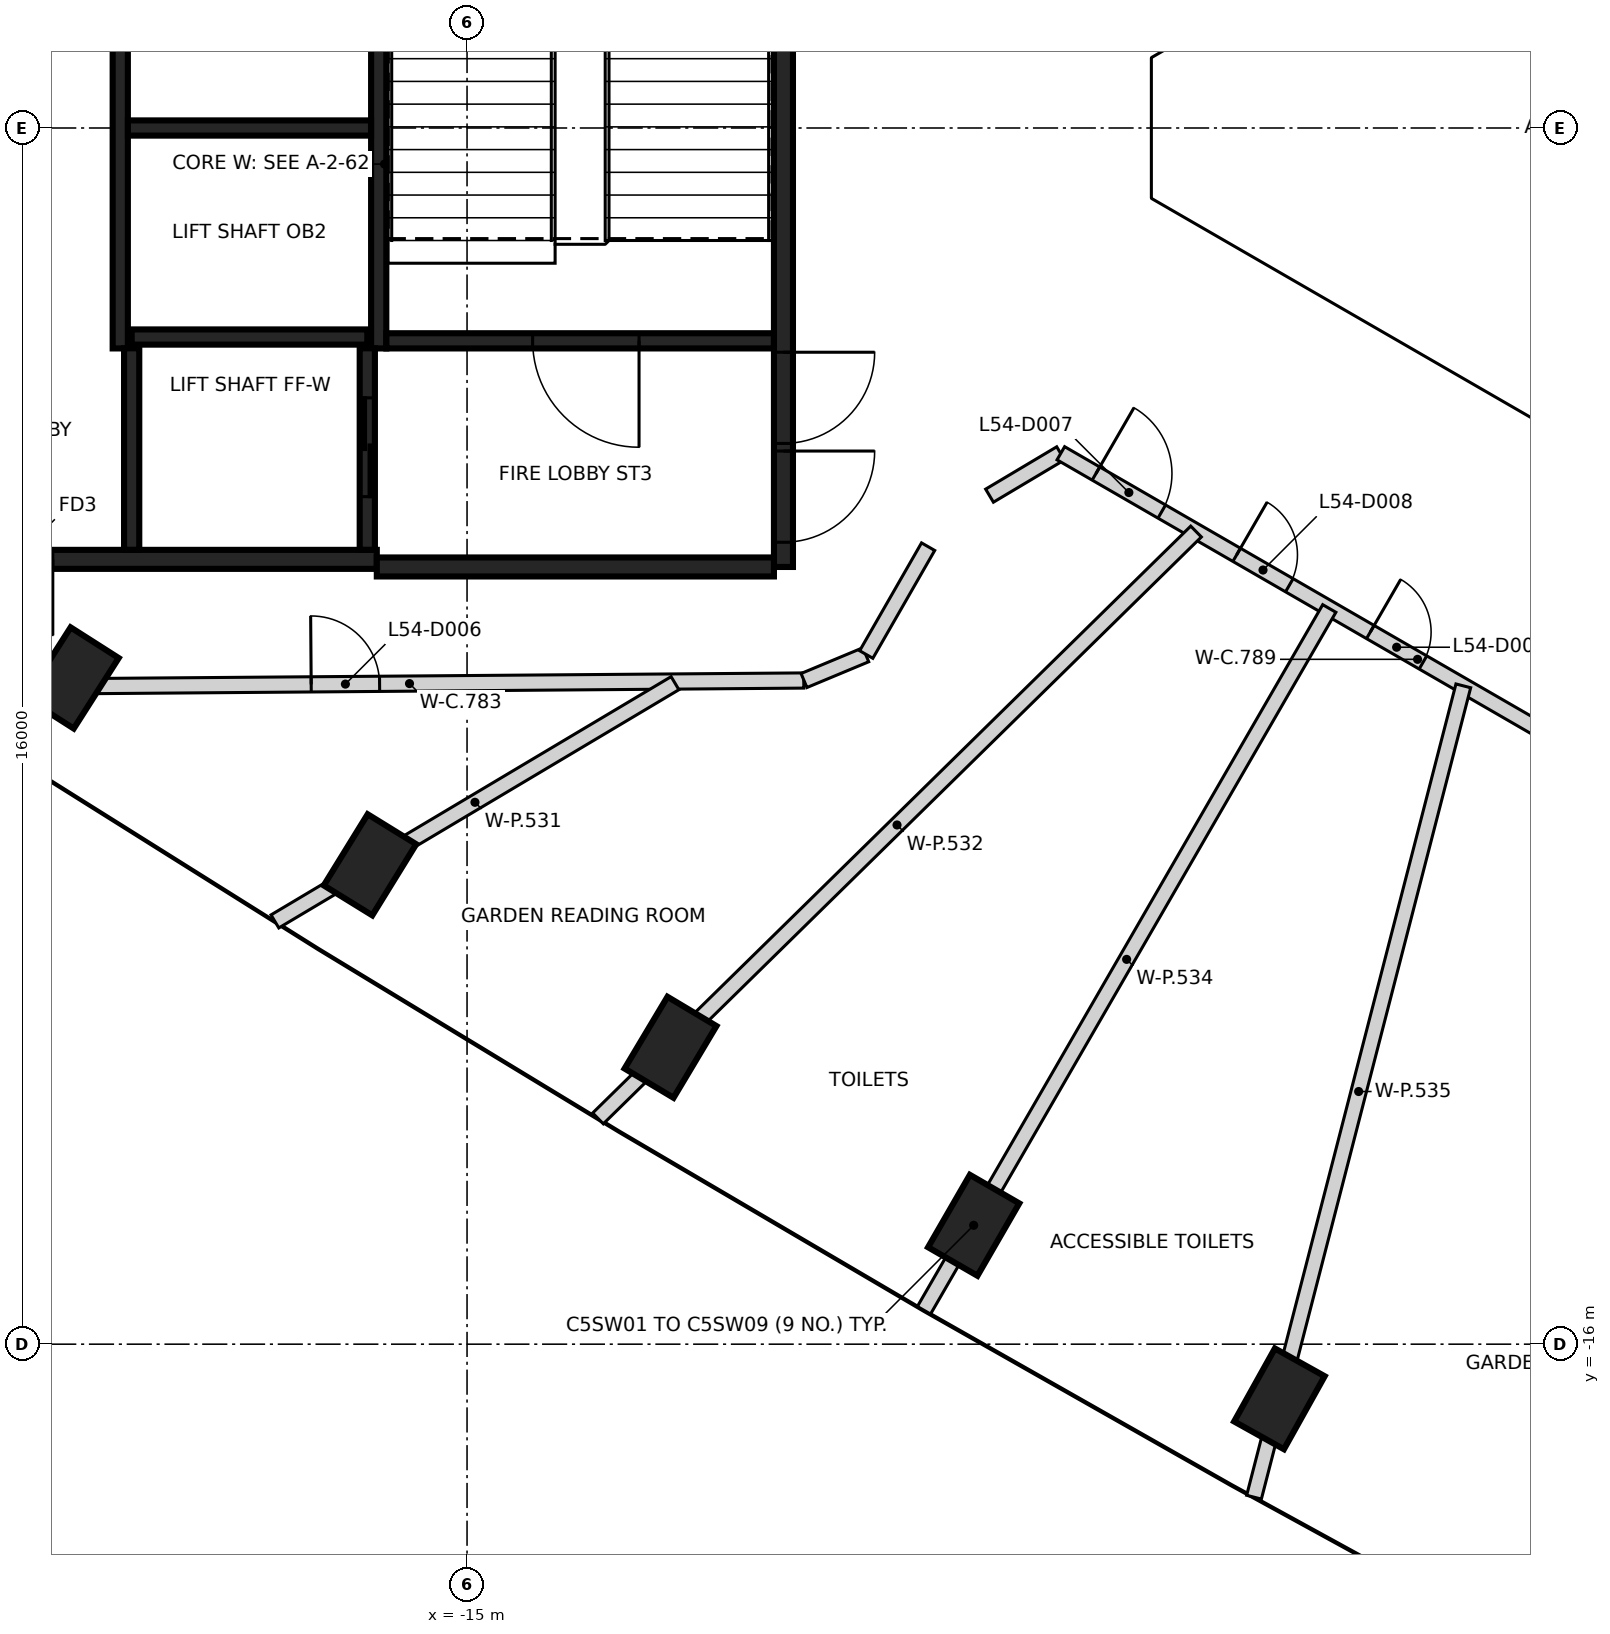
"""IFC4 building model, lengths in metres.
Left out: names, types, materials, properties, quantities, classifications, styles, units other than length and angle.
Written with IfcOpenShell. Run it as: python <this file> out.ifc"""

import sys

from ifc_helpers import new_model, si_unit, direction, frame, frame_2d, origin, origin_2d, place, context, subcontext, project, spatial, rectangle, extrude, element, fill, save


model = new_model("IFC4")
c1 = context("Model", 3, precision=1e-05, world=origin(), true_north=direction((0.0, 1.0)))
c2 = subcontext(c1, "Body", "Model", "MODEL_VIEW")
j1 = project(units=[si_unit("LENGTHUNIT", "METRE"), si_unit("PLANEANGLEUNIT", "RADIAN")], contexts=[c1])
p1 = place(None, origin())
s1 = spatial("IfcSite", under=j1, at=p1, CompositionType="ELEMENT")
p2 = place(p1, origin())
s2 = spatial("IfcBuilding", under=s1, at=p2, CompositionType="ELEMENT")
p3 = place(p2, frame((0.0, 0.0, 216.4)))
s3 = spatial("IfcBuildingStorey", under=s2, at=p3, CompositionType="ELEMENT", Elevation=216.4)
for number, where, z_axis, x_axis in (
    (1, (-20.195, -7.235, -0.35), (0.0, 0.0, 1.0), (0.538, 0.843, 0.0)),
    (2, (-16.277, -9.693, -0.35), (0.0, 0.0, 1.0), (0.525, 0.851, 0.0)),
    (3, (-12.323, -12.094, -0.35), (0.0, 0.0, 1.0), (0.513, 0.858, 0.0)),
    (4, (-8.335, -14.436, -0.35), (0.0, 0.0, 1.0), (0.5, 0.866, 0.0)),
    (5, (-4.312, -16.719, -0.35), (0.0, 0.0, 1.0), (0.487, 0.873, 0.0)),
):
    element("IfcColumn", number, at=place(p3, frame(where, z_axis=z_axis, x_axis=x_axis)), inside=s3, PredefinedType="COLUMN", context=c2, shape_type="SweptSolid", body=[
        extrude(rectangle(XDim=1.1, YDim=0.75, at=origin_2d()), origin(), (0.0, 0.0, 1.0), 5.0),
    ])
p4 = place(p3, frame((-10.837, 5.775, 0.0), z_axis=(0.0, 0.0, 1.0), x_axis=(0.0, -1.0, 0.0)))
e6 = element("IfcWall", 6, at=p4, inside=s3, PredefinedType="SHEAR", context=c2, shape_type="SweptSolid", body=[
    extrude(rectangle(XDim=11.55, YDim=0.25, at=frame_2d((5.775, 0.0))), origin(), (0.0, 0.0, 1.0), 4.65),
])
p5 = place(p4, frame((10.025, 0.0, 0.0)))
e7 = element("IfcOpeningElement", 7, at=p5, cuts=e6, PredefinedType="OPENING", context=c2, shape_type="SweptSolid", body=[
    extrude(rectangle(XDim=1.2, YDim=2.1, at=frame_2d((0.6, 1.05))), frame((0.0, 0.135, 0.0), z_axis=(0.0, -1.0, 0.0), x_axis=(1.0, 0.0, 0.0)), (0.0, 0.0, 1.0), 0.27),
])
p6 = place(p4, frame((8.725, 0.0, 0.0)))
e8 = element("IfcOpeningElement", 8, at=p6, cuts=e6, PredefinedType="OPENING", context=c2, shape_type="SweptSolid", body=[
    extrude(rectangle(XDim=1.2, YDim=2.1, at=frame_2d((0.6, 1.05))), frame((0.0, 0.135, 0.0), z_axis=(0.0, -1.0, 0.0), x_axis=(1.0, 0.0, 0.0)), (0.0, 0.0, 1.0), 0.27),
])
p7 = place(p3, frame((-16.187, -5.675, 0.0), z_axis=(0.0, 0.0, 1.0), x_axis=(-1.0, 0.0, 0.0)))
e9 = element("IfcWall", 9, at=p7, inside=s3, PredefinedType="SHEAR", context=c2, shape_type="SweptSolid", body=[
    extrude(rectangle(XDim=6.125, YDim=0.25, at=frame_2d((3.062, 0.0))), origin(), (0.0, 0.0, 1.0), 4.65),
])
p8 = place(p7, frame((4.263, 0.0, 0.0)))
e10 = element("IfcOpeningElement", 10, at=p8, cuts=e9, PredefinedType="OPENING", context=c2, shape_type="SweptSolid", body=[
    extrude(rectangle(XDim=1.0, YDim=2.1, at=frame_2d((0.5, 1.05))), frame((0.0, 0.135, 0.0), z_axis=(0.0, -1.0, 0.0), x_axis=(1.0, 0.0, 0.0)), (0.0, 0.0, 1.0), 0.27),
])
p9 = place(p3, frame((-10.963, -5.775, 0.0), z_axis=(0.0, 0.0, 1.0), x_axis=(-1.0, 0.0, 0.0)))
e11 = element("IfcWall", 11, at=p9, inside=s3, PredefinedType="SHEAR", context=c2, shape_type="SweptSolid", body=[
    extrude(rectangle(XDim=5.225, YDim=0.25, at=frame_2d((2.612, 0.0))), origin(), (0.0, 0.0, 1.0), 4.65),
])
p10 = place(p3, frame((-16.162, 3.074, 0.0), z_axis=(0.0, 0.0, 1.0), x_axis=(0.0, -1.0, 0.0)))
e12 = element("IfcWall", 12, at=p10, inside=s3, PredefinedType="SHEAR", context=c2, shape_type="SweptSolid", body=[
    extrude(rectangle(XDim=5.974, YDim=0.2, at=frame_2d((2.987, 0.0))), origin(), (0.0, 0.0, 1.0), 4.65),
])
p11 = place(p3, frame((-19.562, -2.9, 0.0), z_axis=(0.0, 0.0, 1.0), x_axis=(0.0, 1.0, 0.0)))
e13 = element("IfcWall", 13, at=p11, inside=s3, PredefinedType="SHEAR", context=c2, shape_type="SweptSolid", body=[
    extrude(rectangle(XDim=6.1, YDim=0.2, at=frame_2d((3.05, 0.0))), origin(), (0.0, 0.0, 1.0), 4.65),
])
p12 = place(p3, frame((-10.963, -2.8, 0.0), z_axis=(0.0, 0.0, 1.0), x_axis=(-1.0, 0.0, 0.0)))
e14 = element("IfcWall", 14, at=p12, inside=s3, PredefinedType="SHEAR", context=c2, shape_type="SweptSolid", body=[
    extrude(rectangle(XDim=5.098, YDim=0.2, at=frame_2d((2.549, 0.0))), origin(), (0.0, 0.0, 1.0), 4.65),
])
p13 = place(p12, frame((1.774, 0.0, 0.0)))
e15 = element("IfcOpeningElement", 15, at=p13, cuts=e14, PredefinedType="OPENING", context=c2, shape_type="SweptSolid", body=[
    extrude(rectangle(XDim=1.4, YDim=2.1, at=frame_2d((0.7, 1.05))), frame((0.0, 0.11, 0.0), z_axis=(0.0, -1.0, 0.0), x_axis=(1.0, 0.0, 0.0)), (0.0, 0.0, 1.0), 0.22),
])
p14 = place(p3, frame((-16.263, 0.0, 0.0), z_axis=(0.0, 0.0, 1.0), x_axis=(-1.0, 0.0, 0.0)))
e16 = element("IfcWall", 16, at=p14, inside=s3, PredefinedType="SHEAR", context=c2, shape_type="SweptSolid", body=[
    extrude(rectangle(XDim=3.198, YDim=0.2, at=frame_2d((1.599, 0.0))), origin(), (0.0, 0.0, 1.0), 4.65),
])
p15 = place(p3, frame((-19.412, -2.75, 0.0), z_axis=(0.0, 0.0, 1.0), x_axis=(1.0, 0.0, 0.0)))
e17 = element("IfcWall", 17, at=p15, inside=s3, PredefinedType="SHEAR", context=c2, shape_type="SweptSolid", body=[
    extrude(rectangle(XDim=3.1, YDim=0.2, at=frame_2d((1.55, 0.0))), origin(), (0.0, 0.0, 1.0), 4.65),
])
p16 = place(p3, frame((-16.312, -2.898, 0.0), z_axis=(0.0, 0.0, 1.0), x_axis=(0.0, -1.0, 0.0)))
e18 = element("IfcWall", 18, at=p16, inside=s3, PredefinedType="SHEAR", context=c2, shape_type="SweptSolid", body=[
    extrude(rectangle(XDim=2.651, YDim=0.2, at=frame_2d((1.325, 0.0))), origin(), (0.0, 0.0, 1.0), 4.65),
])
p17 = place(p16, frame((0.652, 0.0, 0.0)))
e19 = element("IfcOpeningElement", 19, at=p17, cuts=e18, PredefinedType="OPENING", context=c2, shape_type="SweptSolid", body=[
    extrude(rectangle(XDim=1.3, YDim=2.1, at=frame_2d((0.65, 1.05))), frame((0.0, 0.11, 0.0), z_axis=(0.0, -1.0, 0.0), x_axis=(1.0, 0.0, 0.0)), (0.0, 0.0, 1.0), 0.22),
])
p18 = place(p3, frame((-19.412, -5.549, 0.0), z_axis=(0.0, 0.0, 1.0), x_axis=(0.0, 1.0, 0.0)))
e20 = element("IfcWall", 20, at=p18, inside=s3, PredefinedType="SHEAR", context=c2, shape_type="SweptSolid", body=[
    extrude(rectangle(XDim=2.651, YDim=0.2, at=frame_2d((1.325, 0.0))), origin(), (0.0, 0.0, 1.0), 4.65),
])
p19 = place(p3, frame((-20.944, -7.35, 0.0), z_axis=(0.0, 0.0, 1.0), x_axis=(0.999969293938, 0.007836528638, 0.0)))
e21 = element("IfcWall", 21, at=p19, inside=s3, PredefinedType="PARTITIONING", context=c2, shape_type="SweptSolid", body=[
    extrude(rectangle(XDim=10.374, YDim=0.2, at=frame_2d((5.187, 0.0))), origin(), (0.0, 0.0, 1.0), 3.75),
])
p20 = place(p19, frame((3.894, 0.0, 0.0)))
e22 = element("IfcOpeningElement", 22, at=p20, cuts=e21, PredefinedType="OPENING", context=c2, shape_type="SweptSolid", body=[
    extrude(rectangle(XDim=0.9, YDim=2.1, at=frame_2d((0.45, 1.05))), frame((0.0, 0.11, 0.0), z_axis=(0.0, -1.0, 0.0), x_axis=(1.0, 0.0, 0.0)), (0.0, 0.0, 1.0), 0.22),
])
p21 = place(p3, frame((-10.567, -7.269, 0.0), z_axis=(0.0, 0.0, 1.0), x_axis=(0.922929257273, 0.384969591097, 0.0)))
e23 = element("IfcWall", 23, at=p21, inside=s3, PredefinedType="PARTITIONING", context=c2, shape_type="SweptSolid", body=[
    extrude(rectangle(XDim=0.881, YDim=0.2, at=frame_2d((0.44, 0.0))), origin(), (0.0, 0.0, 1.0), 4.65),
])
p22 = place(p3, frame((-9.748, -6.927, 0.0), z_axis=(0.0, 0.0, 1.0), x_axis=(0.497584783928, 0.867415346188, 0.0)))
e24 = element("IfcWall", 24, at=p22, inside=s3, PredefinedType="PARTITIONING", context=c2, shape_type="SweptSolid", body=[
    extrude(rectangle(XDim=1.636, YDim=0.2, at=frame_2d((0.818, 0.0))), origin(), (0.0, 0.0, 1.0), 4.65),
])
p23 = place(p3, frame((-8.126, -4.837, 0.0), z_axis=(0.0, 0.0, 1.0), x_axis=(0.859170790223, 0.511688922323, 0.0)))
e25 = element("IfcWall", 25, at=p23, inside=s3, PredefinedType="PARTITIONING", context=c2, shape_type="SweptSolid", body=[
    extrude(rectangle(XDim=1.088, YDim=0.2, at=frame_2d((0.544, 0.0))), origin(), (0.0, 0.0, 1.0), 4.65),
])
p24 = place(p3, frame((-7.188, -4.279, 0.0), z_axis=(0.0, 0.0, 1.0), x_axis=(0.865917749919, -0.500186415625, 0.0)))
e26 = element("IfcWall", 26, at=p24, inside=s3, PredefinedType="PARTITIONING", context=c2, shape_type="SweptSolid", body=[
    extrude(rectangle(XDim=10.84, YDim=0.2, at=frame_2d((5.42, 0.0))), origin(), (0.0, 0.0, 1.0), 4.65),
])
p25 = place(p24, frame((0.534, 0.0, 0.0)))
e27 = element("IfcOpeningElement", 27, at=p25, cuts=e26, PredefinedType="OPENING", context=c2, shape_type="SweptSolid", body=[
    extrude(rectangle(XDim=1.0, YDim=2.1, at=frame_2d((0.5, 1.05))), frame((0.0, 0.11, 0.0), z_axis=(0.0, -1.0, 0.0), x_axis=(1.0, 0.0, 0.0)), (0.0, 0.0, 1.0), 0.22),
])
p26 = place(p24, frame((2.672, 0.0, 0.0)))
e28 = element("IfcOpeningElement", 28, at=p26, cuts=e26, PredefinedType="OPENING", context=c2, shape_type="SweptSolid", body=[
    extrude(rectangle(XDim=0.8, YDim=2.1, at=frame_2d((0.4, 1.05))), frame((0.0, 0.11, 0.0), z_axis=(0.0, -1.0, 0.0), x_axis=(1.0, 0.0, 0.0)), (0.0, 0.0, 1.0), 0.22),
])
p27 = place(p24, frame((4.702, 0.0, 0.0)))
e29 = element("IfcOpeningElement", 29, at=p27, cuts=e26, PredefinedType="OPENING", context=c2, shape_type="SweptSolid", body=[
    extrude(rectangle(XDim=0.8, YDim=2.1, at=frame_2d((0.4, 1.05))), frame((0.0, 0.11, 0.0), z_axis=(0.0, -1.0, 0.0), x_axis=(1.0, 0.0, 0.0)), (0.0, 0.0, 1.0), 0.22),
])
p28 = place(p24, frame((7.973, 0.0, 0.0)))
e30 = element("IfcOpeningElement", 30, at=p28, cuts=e26, PredefinedType="OPENING", context=c2, shape_type="SweptSolid", body=[
    extrude(rectangle(XDim=1.0, YDim=2.1, at=frame_2d((0.5, 1.05))), frame((0.0, 0.11, 0.0), z_axis=(0.0, -1.0, 0.0), x_axis=(1.0, 0.0, 0.0)), (0.0, 0.0, 1.0), 0.22),
])
p29 = place(p3, frame((-17.528, -10.438, 0.0), z_axis=(0.0, 0.0, 1.0), x_axis=(0.859211134108, 0.51162117531, 0.0)))
e31 = element("IfcWall", 31, at=p29, inside=s3, PredefinedType="PARTITIONING", context=c2, shape_type="SweptSolid", body=[
    extrude(rectangle(XDim=6.126, YDim=0.2, at=frame_2d((3.063, 0.0))), origin(), (0.0, 0.0, 1.0), 4.65),
])
p30 = place(p3, frame((-13.277, -13.03, 0.0), z_axis=(0.0, 0.0, 1.0), x_axis=(0.713763428774, 0.700386870054, 0.0)))
e32 = element("IfcWall", 32, at=p30, inside=s3, PredefinedType="PARTITIONING", context=c2, shape_type="SweptSolid", body=[
    extrude(rectangle(XDim=11.024, YDim=0.2, at=frame_2d((5.512, 0.0))), origin(), (0.0, 0.0, 1.0), 4.65),
])
p31 = place(p3, frame((-8.989, -15.554, 0.0), z_axis=(0.0, 0.0, 1.0), x_axis=(0.500133388309, 0.865948378311, 0.0)))
e33 = element("IfcWall", 33, at=p31, inside=s3, PredefinedType="PARTITIONING", context=c2, shape_type="SweptSolid", body=[
    extrude(rectangle(XDim=10.662, YDim=0.2, at=frame_2d((5.331, 0.0))), origin(), (0.0, 0.0, 1.0), 4.65),
])
p32 = place(p3, frame((-4.646, -18.013, 0.0), z_axis=(0.0, 0.0, 1.0), x_axis=(0.249782901113, 0.968301865283, 0.0)))
e34 = element("IfcWall", 34, at=p32, inside=s3, PredefinedType="PARTITIONING", context=c2, shape_type="SweptSolid", body=[
    extrude(rectangle(XDim=11.023, YDim=0.2, at=frame_2d((5.512, 0.0))), origin(), (0.0, 0.0, 1.0), 4.65),
])
p33 = place(p3, frame((0.0, 0.0, -0.35)))
p34 = place(p33, origin())
p35 = place(p34, frame((0.0, 0.0, 0.3)))
e35 = element("IfcWindow", 35, at=p35, inside=s3, PartitioningType="SINGLE_PANEL", PredefinedType="SKYLIGHT", context=c2, shape_type="SweptSolid", body=[
    extrude(rectangle(XDim=6.41, YDim=4.0, at=origin_2d()), origin(), (0.0, 0.0, 1.0), 0.05),
])
p36 = place(p17, origin())
e36 = element("IfcDoor", 36, at=p36, inside=s3, OperationType="SLIDING_TO_RIGHT", PredefinedType="DOOR", context=c2, shape_type="SweptSolid", body=[
    extrude(rectangle(XDim=1.3, YDim=2.1, at=frame_2d((0.65, 1.05))), frame((0.0, 0.025, 0.0), z_axis=(0.0, -1.0, 0.0), x_axis=(1.0, 0.0, 0.0)), (0.0, 0.0, 1.0), 0.05),
])
fill(e19, e36)
p37 = place(p8, origin())
e37 = element("IfcDoor", 37, at=p37, inside=s3, OperationType="SINGLE_SWING_LEFT", PredefinedType="DOOR", context=c2, shape_type="SweptSolid", body=[
    extrude(rectangle(XDim=1.0, YDim=2.1, at=frame_2d((0.5, 1.05))), frame((0.0, 0.025, 0.0), z_axis=(0.0, -1.0, 0.0), x_axis=(1.0, 0.0, 0.0)), (0.0, 0.0, 1.0), 0.05),
])
fill(e10, e37)
p38 = place(p5, origin())
e38 = element("IfcDoor", 38, at=p38, inside=s3, OperationType="SINGLE_SWING_LEFT", PredefinedType="DOOR", context=c2, shape_type="SweptSolid", body=[
    extrude(rectangle(XDim=1.2, YDim=2.1, at=frame_2d((0.6, 1.05))), frame((0.0, 0.025, 0.0), z_axis=(0.0, -1.0, 0.0), x_axis=(1.0, 0.0, 0.0)), (0.0, 0.0, 1.0), 0.05),
])
fill(e7, e38)
p39 = place(p6, origin())
e39 = element("IfcDoor", 39, at=p39, inside=s3, OperationType="SINGLE_SWING_RIGHT", PredefinedType="DOOR", context=c2, shape_type="SweptSolid", body=[
    extrude(rectangle(XDim=1.2, YDim=2.1, at=frame_2d((0.6, 1.05))), frame((0.0, 0.025, 0.0), z_axis=(0.0, -1.0, 0.0), x_axis=(1.0, 0.0, 0.0)), (0.0, 0.0, 1.0), 0.05),
])
fill(e8, e39)
p40 = place(p13, origin())
e40 = element("IfcDoor", 40, at=p40, inside=s3, OperationType="SINGLE_SWING_RIGHT", PredefinedType="DOOR", context=c2, shape_type="SweptSolid", body=[
    extrude(rectangle(XDim=1.4, YDim=2.1, at=frame_2d((0.7, 1.05))), frame((0.0, 0.025, 0.0), z_axis=(0.0, -1.0, 0.0), x_axis=(1.0, 0.0, 0.0)), (0.0, 0.0, 1.0), 0.05),
])
fill(e15, e40)
p41 = place(p20, origin())
e41 = element("IfcDoor", 41, at=p41, inside=s3, OperationType="SINGLE_SWING_LEFT", PredefinedType="DOOR", context=c2, shape_type="SweptSolid", body=[
    extrude(rectangle(XDim=0.9, YDim=2.1, at=frame_2d((0.45, 1.05))), frame((0.0, 0.025, 0.0), z_axis=(0.0, -1.0, 0.0), x_axis=(1.0, 0.0, 0.0)), (0.0, 0.0, 1.0), 0.05),
])
fill(e22, e41)
p42 = place(p25, frame((1.0, 0.0, 0.0), z_axis=(0.0, 0.0, 1.0), x_axis=(-1.0, 0.0, 0.0)))
e42 = element("IfcDoor", 42, at=p42, inside=s3, OperationType="SINGLE_SWING_LEFT", PredefinedType="DOOR", context=c2, shape_type="SweptSolid", body=[
    extrude(rectangle(XDim=1.0, YDim=2.1, at=frame_2d((0.5, 1.05))), frame((0.0, 0.025, 0.0), z_axis=(0.0, -1.0, 0.0), x_axis=(1.0, 0.0, 0.0)), (0.0, 0.0, 1.0), 0.05),
])
fill(e27, e42)
p43 = place(p26, frame((0.8, 0.0, 0.0), z_axis=(0.0, 0.0, 1.0), x_axis=(-1.0, 0.0, 0.0)))
e43 = element("IfcDoor", 43, at=p43, inside=s3, OperationType="SINGLE_SWING_LEFT", PredefinedType="DOOR", context=c2, shape_type="SweptSolid", body=[
    extrude(rectangle(XDim=0.8, YDim=2.1, at=frame_2d((0.4, 1.05))), frame((0.0, 0.025, 0.0), z_axis=(0.0, -1.0, 0.0), x_axis=(1.0, 0.0, 0.0)), (0.0, 0.0, 1.0), 0.05),
])
fill(e28, e43)
p44 = place(p27, frame((0.8, 0.0, 0.0), z_axis=(0.0, 0.0, 1.0), x_axis=(-1.0, 0.0, 0.0)))
e44 = element("IfcDoor", 44, at=p44, inside=s3, OperationType="SINGLE_SWING_LEFT", PredefinedType="DOOR", context=c2, shape_type="SweptSolid", body=[
    extrude(rectangle(XDim=0.8, YDim=2.1, at=frame_2d((0.4, 1.05))), frame((0.0, 0.025, 0.0), z_axis=(0.0, -1.0, 0.0), x_axis=(1.0, 0.0, 0.0)), (0.0, 0.0, 1.0), 0.05),
])
fill(e29, e44)
save(model, sys.argv[1])
